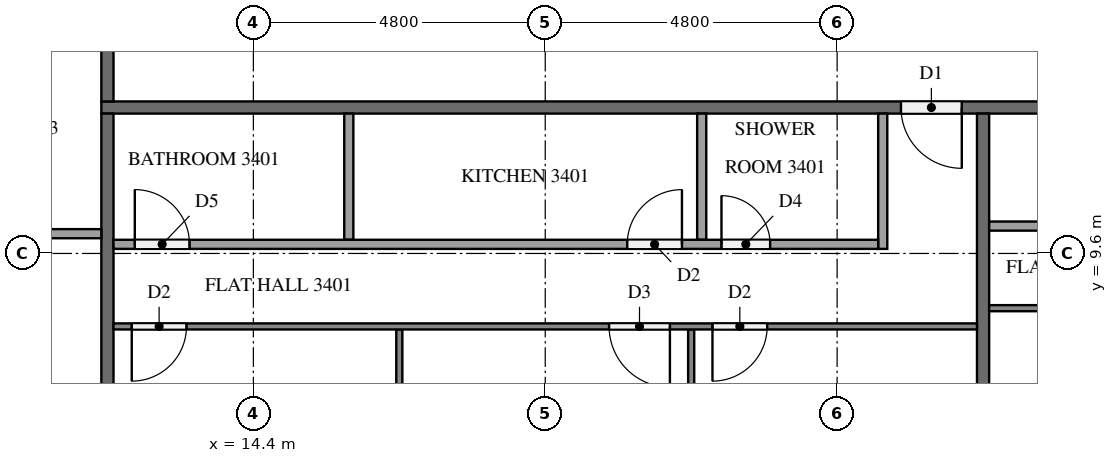
"""IFC4 building model, lengths in metres.
Left out: names, types, materials, properties, quantities, classifications, styles, units other than length and angle.
Written with IfcOpenShell. Run it as: python <this file> out.ifc"""

import sys

from ifc_helpers import new_model, si_unit, direction, frame, frame_2d, origin, place, context, subcontext, project, spatial, rectangle, extrude, element, fill, save


model = new_model("IFC4")
c1 = context("Model", 3, precision=1e-05, world=origin(), true_north=direction((0.0, 1.0)))
c2 = subcontext(c1, "Body", "Model", "MODEL_VIEW")
j1 = project(units=[si_unit("LENGTHUNIT", "METRE"), si_unit("PLANEANGLEUNIT", "RADIAN")], contexts=[c1])
p1 = place(None, origin())
s1 = spatial("IfcSite", under=j1, at=p1, CompositionType="ELEMENT")
p2 = place(p1, origin())
s2 = spatial("IfcBuilding", under=s1, at=p2, CompositionType="ELEMENT")
p3 = place(p2, frame((0.0, 0.0, 133.1)))
s3 = spatial("IfcBuildingStorey", under=s2, at=p3, CompositionType="ELEMENT", Elevation=133.1)
p4 = place(p3, frame((50.5, 12.0, 0.0), z_axis=(0.0, 0.0, 1.0), x_axis=(-1.0, 0.0, 0.0)))
e1 = element("IfcWall", 1, at=p4, inside=s3, PredefinedType="PARTITIONING", context=c2, shape_type="SweptSolid", body=[
    extrude(rectangle(XDim=38.6, YDim=0.2, at=frame_2d((19.3, 0.0))), origin(), (0.0, 0.0, 1.0), 3.2),
])
p5 = place(p4, frame((24.45, 0.0, 0.0)))
e2 = element("IfcOpeningElement", 2, at=p5, cuts=e1, PredefinedType="OPENING", context=c2, shape_type="SweptSolid", body=[
    extrude(rectangle(XDim=1.0, YDim=2.1, at=frame_2d((0.5, 1.05))), frame((0.0, 0.11, 0.0), z_axis=(0.0, -1.0, 0.0), x_axis=(1.0, 0.0, 0.0)), (0.0, 0.0, 1.0), 0.22),
])
p6 = place(p4, frame((10.05, 0.0, 0.0)))
e3 = element("IfcOpeningElement", 3, at=p6, cuts=e1, PredefinedType="OPENING", context=c2, shape_type="SweptSolid", body=[
    extrude(rectangle(XDim=1.0, YDim=2.1, at=frame_2d((0.5, 1.05))), frame((0.0, 0.11, 0.0), z_axis=(0.0, -1.0, 0.0), x_axis=(1.0, 0.0, 0.0)), (0.0, 0.0, 1.0), 0.22),
])
p7 = place(p4, frame((8.35, 0.0, 0.0)))
e4 = element("IfcOpeningElement", 4, at=p7, cuts=e1, PredefinedType="OPENING", context=c2, shape_type="SweptSolid", body=[
    extrude(rectangle(XDim=1.0, YDim=2.1, at=frame_2d((0.5, 1.05))), frame((0.0, 0.11, 0.0), z_axis=(0.0, -1.0, 0.0), x_axis=(1.0, 0.0, 0.0)), (0.0, 0.0, 1.0), 0.22),
])
p8 = place(p3, frame((12.0, 12.1, 0.0), z_axis=(0.0, 0.0, 1.0), x_axis=(0.0, 1.0, 0.0)))
e5 = element("IfcWall", 5, at=p8, inside=s3, PredefinedType="PARTITIONING", context=c2, shape_type="SweptSolid", body=[
    extrude(rectangle(XDim=2.8, YDim=0.2, at=frame_2d((1.4, 0.0))), origin(), (0.0, 0.0, 1.0), 3.2),
])
p9 = place(p8, frame((1.55, 0.0, 0.0)))
e6 = element("IfcOpeningElement", 6, at=p9, cuts=e5, PredefinedType="OPENING", context=c2, shape_type="SweptSolid", body=[
    extrude(rectangle(XDim=1.0, YDim=2.1, at=frame_2d((0.5, 1.05))), frame((0.0, 0.11, 0.0), z_axis=(0.0, -1.0, 0.0), x_axis=(1.0, 0.0, 0.0)), (0.0, 0.0, 1.0), 0.22),
])
for number, where, z_axis, x_axis in (
    (7, (26.4, 11.9, 0.0), (0.0, 0.0, 1.0), (0.0, -1.0, 0.0)),
    (8, (12.0, 4.9, 0.0), (0.0, 0.0, 1.0), (0.0, 1.0, 0.0)),
):
    element("IfcWall", number, at=place(p3, frame(where, z_axis=z_axis, x_axis=x_axis)), inside=s3, PredefinedType="PARTITIONING", context=c2, shape_type="SweptSolid", body=[
        extrude(rectangle(XDim=7.0, YDim=0.2, at=frame_2d((3.5, 0.0))), origin(), (0.0, 0.0, 1.0), 3.2),
    ])
for number, where, z_axis, x_axis in (
    (9, (21.6, 8.35, 0.0), (0.0, 0.0, 1.0), (0.0, -1.0, 0.0)),
    (10, (16.8, 8.35, 0.0), (0.0, 0.0, 1.0), (0.0, -1.0, 0.0)),
):
    element("IfcWall", number, at=place(p3, frame(where, z_axis=z_axis, x_axis=x_axis)), inside=s3, PredefinedType="PARTITIONING", context=c2, shape_type="SweptSolid", body=[
        extrude(rectangle(XDim=3.45, YDim=0.1, at=frame_2d((1.725, 0.0))), origin(), (0.0, 0.0, 1.0), 3.2),
    ])
p10 = place(p3, frame((26.3, 8.4, 0.0), z_axis=(0.0, 0.0, 1.0), x_axis=(-1.0, 0.0, 0.0)))
e11 = element("IfcWall", 11, at=p10, inside=s3, PredefinedType="PARTITIONING", context=c2, shape_type="SweptSolid", body=[
    extrude(rectangle(XDim=14.2, YDim=0.1, at=frame_2d((7.1, 0.0))), origin(), (0.0, 0.0, 1.0), 3.2),
])
p11 = place(p10, frame((3.45, 0.0, 0.0)))
e12 = element("IfcOpeningElement", 12, at=p11, cuts=e11, PredefinedType="OPENING", context=c2, shape_type="SweptSolid", body=[
    extrude(rectangle(XDim=0.9, YDim=2.1, at=frame_2d((0.45, 1.05))), frame((0.0, 0.06, 0.0), z_axis=(0.0, -1.0, 0.0), x_axis=(1.0, 0.0, 0.0)), (0.0, 0.0, 1.0), 0.12),
])
p12 = place(p10, frame((5.05, 0.0, 0.0)))
e13 = element("IfcOpeningElement", 13, at=p12, cuts=e11, PredefinedType="OPENING", context=c2, shape_type="SweptSolid", body=[
    extrude(rectangle(XDim=1.0, YDim=2.1, at=frame_2d((0.5, 1.05))), frame((0.0, 0.06, 0.0), z_axis=(0.0, -1.0, 0.0), x_axis=(1.0, 0.0, 0.0)), (0.0, 0.0, 1.0), 0.12),
])
p13 = place(p10, frame((13.0, 0.0, 0.0)))
e14 = element("IfcOpeningElement", 14, at=p13, cuts=e11, PredefinedType="OPENING", context=c2, shape_type="SweptSolid", body=[
    extrude(rectangle(XDim=0.9, YDim=2.1, at=frame_2d((0.45, 1.05))), frame((0.0, 0.06, 0.0), z_axis=(0.0, -1.0, 0.0), x_axis=(1.0, 0.0, 0.0)), (0.0, 0.0, 1.0), 0.12),
])
for number, where, z_axis, x_axis in (
    (15, (21.773, 11.9, 0.0), (0.0, 0.0, 1.0), (0.0, -1.0, 0.0)),
    (16, (15.969, 11.9, 0.0), (0.0, 0.0, 1.0), (0.0, -1.0, 0.0)),
):
    element("IfcWall", number, at=place(p3, frame(where, z_axis=z_axis, x_axis=x_axis)), inside=s3, PredefinedType="PARTITIONING", context=c2, shape_type="SweptSolid", body=[
        extrude(rectangle(XDim=2.075, YDim=0.15, at=frame_2d((1.038, 0.0))), origin(), (0.0, 0.0, 1.0), 3.2),
    ])
p14 = place(p3, frame((24.75, 11.9, 0.0), z_axis=(0.0, 0.0, 1.0), x_axis=(0.0, -1.0, 0.0)))
e17 = element("IfcWall", 17, at=p14, inside=s3, PredefinedType="PARTITIONING", context=c2, shape_type="SweptSolid", body=[
    extrude(rectangle(XDim=2.225, YDim=0.15, at=frame_2d((1.112, 0.0))), origin(), (0.0, 0.0, 1.0), 3.2),
])
p15 = place(p3, frame((12.1, 9.75, 0.0), z_axis=(0.0, 0.0, 1.0), x_axis=(1.0, 0.0, 0.0)))
e18 = element("IfcWall", 18, at=p15, inside=s3, PredefinedType="PARTITIONING", context=c2, shape_type="SweptSolid", body=[
    extrude(rectangle(XDim=12.575, YDim=0.15, at=frame_2d((6.288, 0.0))), origin(), (0.0, 0.0, 1.0), 3.2),
])
p16 = place(p15, frame((9.998, 0.0, 0.0)))
e19 = element("IfcOpeningElement", 19, at=p16, cuts=e18, PredefinedType="OPENING", context=c2, shape_type="SweptSolid", body=[
    extrude(rectangle(XDim=0.8, YDim=2.1, at=frame_2d((0.4, 1.05))), frame((0.0, 0.085, 0.0), z_axis=(0.0, -1.0, 0.0), x_axis=(1.0, 0.0, 0.0)), (0.0, 0.0, 1.0), 0.17),
])
p17 = place(p15, frame((8.448, 0.0, 0.0)))
e20 = element("IfcOpeningElement", 20, at=p17, cuts=e18, PredefinedType="OPENING", context=c2, shape_type="SweptSolid", body=[
    extrude(rectangle(XDim=0.9, YDim=2.1, at=frame_2d((0.45, 1.05))), frame((0.0, 0.085, 0.0), z_axis=(0.0, -1.0, 0.0), x_axis=(1.0, 0.0, 0.0)), (0.0, 0.0, 1.0), 0.17),
])
p18 = place(p15, frame((0.35, 0.0, 0.0)))
e21 = element("IfcOpeningElement", 21, at=p18, cuts=e18, PredefinedType="OPENING", context=c2, shape_type="SweptSolid", body=[
    extrude(rectangle(XDim=0.9, YDim=2.1, at=frame_2d((0.45, 1.05))), frame((0.0, 0.085, 0.0), z_axis=(0.0, -1.0, 0.0), x_axis=(1.0, 0.0, 0.0)), (0.0, 0.0, 1.0), 0.17),
])
p19 = place(p3, frame((40.7, 8.7, 0.0), z_axis=(0.0, 0.0, 1.0), x_axis=(-1.0, 0.0, 0.0)))
e22 = element("IfcWall", 22, at=p19, inside=s3, PredefinedType="PARTITIONING", context=c2, shape_type="SweptSolid", body=[
    extrude(rectangle(XDim=14.2, YDim=0.1, at=frame_2d((7.1, 0.0))), origin(), (0.0, 0.0, 1.0), 3.2),
])
p20 = place(p19, frame((0.3, 0.0, 0.0)))
e23 = element("IfcOpeningElement", 23, at=p20, cuts=e22, PredefinedType="OPENING", context=c2, shape_type="SweptSolid", body=[
    extrude(rectangle(XDim=0.9, YDim=2.1, at=frame_2d((0.45, 1.05))), frame((0.0, 0.06, 0.0), z_axis=(0.0, -1.0, 0.0), x_axis=(1.0, 0.0, 0.0)), (0.0, 0.0, 1.0), 0.12),
])
p21 = place(p19, frame((8.15, 0.0, 0.0)))
e24 = element("IfcOpeningElement", 24, at=p21, cuts=e22, PredefinedType="OPENING", context=c2, shape_type="SweptSolid", body=[
    extrude(rectangle(XDim=1.0, YDim=2.1, at=frame_2d((0.5, 1.05))), frame((0.0, 0.06, 0.0), z_axis=(0.0, -1.0, 0.0), x_axis=(1.0, 0.0, 0.0)), (0.0, 0.0, 1.0), 0.12),
])
p22 = place(p19, frame((9.85, 0.0, 0.0)))
e25 = element("IfcOpeningElement", 25, at=p22, cuts=e22, PredefinedType="OPENING", context=c2, shape_type="SweptSolid", body=[
    extrude(rectangle(XDim=0.9, YDim=2.1, at=frame_2d((0.45, 1.05))), frame((0.0, 0.06, 0.0), z_axis=(0.0, -1.0, 0.0), x_axis=(1.0, 0.0, 0.0)), (0.0, 0.0, 1.0), 0.12),
])
p23 = place(p3, frame((26.5, 10.05, 0.0), z_axis=(0.0, 0.0, 1.0), x_axis=(1.0, 0.0, 0.0)))
e26 = element("IfcWall", 26, at=p23, inside=s3, PredefinedType="PARTITIONING", context=c2, shape_type="SweptSolid", body=[
    extrude(rectangle(XDim=12.575, YDim=0.15, at=frame_2d((6.288, 0.0))), origin(), (0.0, 0.0, 1.0), 3.2),
])
p24 = place(p23, frame((11.475, 0.0, 0.0)))
e27 = element("IfcOpeningElement", 27, at=p24, cuts=e26, PredefinedType="OPENING", context=c2, shape_type="SweptSolid", body=[
    extrude(rectangle(XDim=0.8, YDim=2.1, at=frame_2d((0.4, 1.05))), frame((0.0, 0.085, 0.0), z_axis=(0.0, -1.0, 0.0), x_axis=(1.0, 0.0, 0.0)), (0.0, 0.0, 1.0), 0.17),
])
p25 = place(p23, frame((6.129, 0.0, 0.0)))
e28 = element("IfcOpeningElement", 28, at=p25, cuts=e26, PredefinedType="OPENING", context=c2, shape_type="SweptSolid", body=[
    extrude(rectangle(XDim=0.9, YDim=2.1, at=frame_2d((0.45, 1.05))), frame((0.0, 0.085, 0.0), z_axis=(0.0, -1.0, 0.0), x_axis=(1.0, 0.0, 0.0)), (0.0, 0.0, 1.0), 0.17),
])
p26 = place(p23, frame((4.579, 0.0, 0.0)))
e29 = element("IfcOpeningElement", 29, at=p26, cuts=e26, PredefinedType="OPENING", context=c2, shape_type="SweptSolid", body=[
    extrude(rectangle(XDim=0.9, YDim=2.1, at=frame_2d((0.45, 1.05))), frame((0.0, 0.085, 0.0), z_axis=(0.0, -1.0, 0.0), x_axis=(1.0, 0.0, 0.0)), (0.0, 0.0, 1.0), 0.17),
])
p27 = place(p3, frame((11.9, 9.925, 0.0), z_axis=(0.0, 0.0, 1.0), x_axis=(-1.0, 0.0, 0.0)))
e30 = element("IfcWall", 30, at=p27, inside=s3, PredefinedType="PARTITIONING", context=c2, shape_type="SweptSolid", body=[
    extrude(rectangle(XDim=3.875, YDim=0.15, at=frame_2d((1.938, 0.0))), origin(), (0.0, 0.0, 1.0), 3.2),
])
p28 = place(p5, origin())
e31 = element("IfcDoor", 31, at=p28, inside=s3, OperationType="SINGLE_SWING_LEFT", PredefinedType="DOOR", context=c2, shape_type="SweptSolid", body=[
    extrude(rectangle(XDim=1.0, YDim=2.1, at=frame_2d((0.5, 1.05))), frame((0.0, 0.025, 0.0), z_axis=(0.0, -1.0, 0.0), x_axis=(1.0, 0.0, 0.0)), (0.0, 0.0, 1.0), 0.05),
])
fill(e2, e31)
p29 = place(p11, origin())
e32 = element("IfcDoor", 32, at=p29, inside=s3, OperationType="SINGLE_SWING_RIGHT", PredefinedType="DOOR", context=c2, shape_type="SweptSolid", body=[
    extrude(rectangle(XDim=0.9, YDim=2.1, at=frame_2d((0.45, 1.05))), frame((0.0, 0.025, 0.0), z_axis=(0.0, -1.0, 0.0), x_axis=(1.0, 0.0, 0.0)), (0.0, 0.0, 1.0), 0.05),
])
fill(e12, e32)
p30 = place(p12, origin())
e33 = element("IfcDoor", 33, at=p30, inside=s3, OperationType="SINGLE_SWING_LEFT", PredefinedType="DOOR", context=c2, shape_type="SweptSolid", body=[
    extrude(rectangle(XDim=1.0, YDim=2.1, at=frame_2d((0.5, 1.05))), frame((0.0, 0.025, 0.0), z_axis=(0.0, -1.0, 0.0), x_axis=(1.0, 0.0, 0.0)), (0.0, 0.0, 1.0), 0.05),
])
fill(e13, e33)
p31 = place(p13, origin())
e34 = element("IfcDoor", 34, at=p31, inside=s3, OperationType="SINGLE_SWING_RIGHT", PredefinedType="DOOR", context=c2, shape_type="SweptSolid", body=[
    extrude(rectangle(XDim=0.9, YDim=2.1, at=frame_2d((0.45, 1.05))), frame((0.0, 0.025, 0.0), z_axis=(0.0, -1.0, 0.0), x_axis=(1.0, 0.0, 0.0)), (0.0, 0.0, 1.0), 0.05),
])
fill(e14, e34)
p32 = place(p16, origin())
e35 = element("IfcDoor", 35, at=p32, inside=s3, OperationType="SINGLE_SWING_LEFT", PredefinedType="DOOR", context=c2, shape_type="SweptSolid", body=[
    extrude(rectangle(XDim=0.8, YDim=2.1, at=frame_2d((0.4, 1.05))), frame((0.0, 0.025, 0.0), z_axis=(0.0, -1.0, 0.0), x_axis=(1.0, 0.0, 0.0)), (0.0, 0.0, 1.0), 0.05),
])
fill(e19, e35)
p33 = place(p17, origin())
e36 = element("IfcDoor", 36, at=p33, inside=s3, OperationType="SINGLE_SWING_RIGHT", PredefinedType="DOOR", context=c2, shape_type="SweptSolid", body=[
    extrude(rectangle(XDim=0.9, YDim=2.1, at=frame_2d((0.45, 1.05))), frame((0.0, 0.025, 0.0), z_axis=(0.0, -1.0, 0.0), x_axis=(1.0, 0.0, 0.0)), (0.0, 0.0, 1.0), 0.05),
])
fill(e20, e36)
p34 = place(p18, origin())
e37 = element("IfcDoor", 37, at=p34, inside=s3, OperationType="SINGLE_SWING_LEFT", PredefinedType="DOOR", context=c2, shape_type="SweptSolid", body=[
    extrude(rectangle(XDim=0.9, YDim=2.1, at=frame_2d((0.45, 1.05))), frame((0.0, 0.025, 0.0), z_axis=(0.0, -1.0, 0.0), x_axis=(1.0, 0.0, 0.0)), (0.0, 0.0, 1.0), 0.05),
])
fill(e21, e37)
save(model, sys.argv[1])
